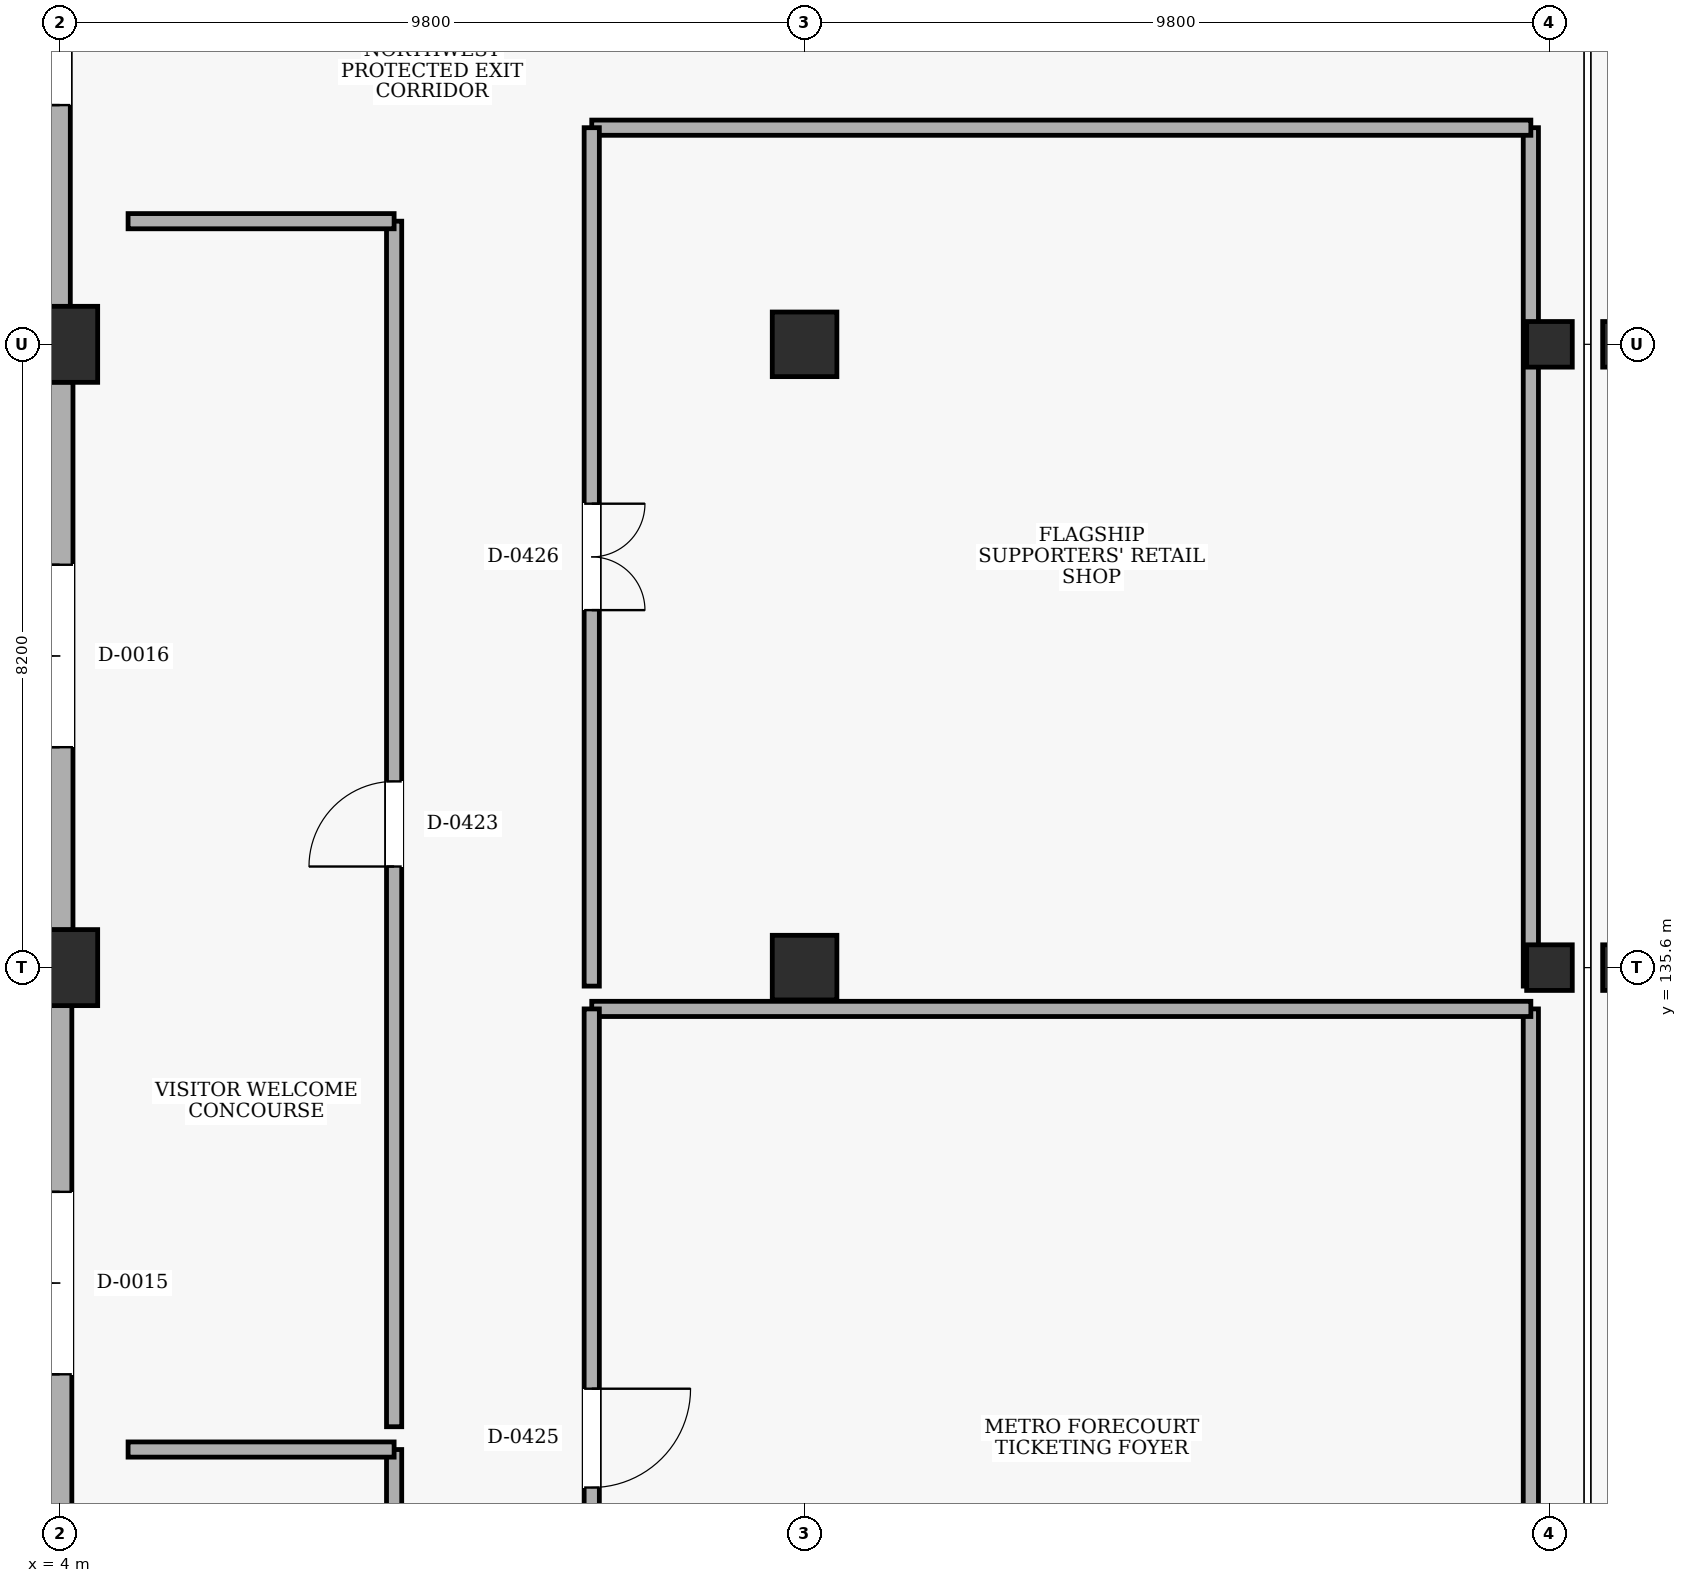
"""IFC4 building model, lengths in metres.
Left out: names, types, materials, properties, quantities, classifications, styles, units other than length and angle.
Written with IfcOpenShell. Run it as: python <this file> out.ifc"""

import sys

from ifc_helpers import new_model, si_unit, direction, frame, frame_2d, origin, origin_2d, place, context, subcontext, project, spatial, rectangle, extrude, element, fill, save


model = new_model("IFC4")
c1 = context("Model", 3, precision=1e-05, world=origin(), true_north=direction((0.0, 1.0)))
c2 = subcontext(c1, "Body", "Model", "MODEL_VIEW")
j1 = project(units=[si_unit("LENGTHUNIT", "METRE"), si_unit("PLANEANGLEUNIT", "RADIAN")], contexts=[c1])
p1 = place(None, origin())
s1 = spatial("IfcSite", under=j1, at=p1, CompositionType="ELEMENT")
p2 = place(p1, origin())
s2 = spatial("IfcBuilding", under=s1, at=p2, CompositionType="ELEMENT")
p3 = place(p2, origin())
s3 = spatial("IfcBuildingStorey", under=s2, at=p3, CompositionType="ELEMENT", Elevation=0.0)
for number, where, z_axis, x_axis in (
    (1, (4.0, 135.6, 0.0), (0.0, 0.0, 1.0), (1.0, 0.0, 0.0)),
    (2, (4.0, 143.8, 0.0), (0.0, 0.0, 1.0), (1.0, 0.0, 0.0)),
):
    element("IfcColumn", number, at=place(p3, frame(where, z_axis=z_axis, x_axis=x_axis)), inside=s3, PredefinedType="COLUMN", context=c2, shape_type="SweptSolid", body=[
        extrude(rectangle(XDim=1.0, YDim=1.0, at=origin_2d()), origin(), (0.0, 0.0, 1.0), 5.4),
    ])
for number, where, z_axis, x_axis in (
    (3, (13.8, 135.6, 0.0), (0.0, 0.0, 1.0), (1.0, 0.0, 0.0)),
    (4, (13.8, 143.8, 0.0), (0.0, 0.0, 1.0), (1.0, 0.0, 0.0)),
):
    element("IfcColumn", number, at=place(p3, frame(where, z_axis=z_axis, x_axis=x_axis)), inside=s3, PredefinedType="COLUMN", context=c2, shape_type="SweptSolid", body=[
        extrude(rectangle(XDim=0.85, YDim=0.85, at=origin_2d()), origin(), (0.0, 0.0, 1.0), 5.4),
    ])
for number, where, z_axis, x_axis in (
    (5, (23.6, 135.6, 0.0), (0.0, 0.0, 1.0), (1.0, 0.0, 0.0)),
    (6, (23.6, 143.8, 0.0), (0.0, 0.0, 1.0), (1.0, 0.0, 0.0)),
    (7, (24.6, 135.6, 0.0), (0.0, 0.0, 1.0), (1.0, 0.0, 0.0)),
    (8, (24.6, 143.8, 0.0), (0.0, 0.0, 1.0), (1.0, 0.0, 0.0)),
):
    element("IfcColumn", number, at=place(p3, frame(where, z_axis=z_axis, x_axis=x_axis)), inside=s3, PredefinedType="COLUMN", context=c2, shape_type="SweptSolid", body=[
        extrude(rectangle(XDim=0.6, YDim=0.6, at=origin_2d()), origin(), (0.0, 0.0, 1.0), 5.4),
    ])
p4 = place(p3, frame((4.0, 127.795, 0.0), z_axis=(0.0, 0.0, 1.0), x_axis=(0.0, 1.0, 0.0)))
e9 = element("IfcWall", 9, at=p4, inside=s3, PredefinedType="SOLIDWALL", context=c2, shape_type="SweptSolid", body=[
    extrude(rectangle(XDim=7.31, YDim=0.32, at=frame_2d((3.655, 0.0))), origin(), (0.0, 0.0, 1.0), 4.26),
])
p5 = place(p4, frame((2.455, 0.0, 0.0)))
e10 = element("IfcOpeningElement", 10, at=p5, cuts=e9, PredefinedType="OPENING", context=c2, shape_type="SweptSolid", body=[
    extrude(rectangle(XDim=2.4, YDim=2.2, at=frame_2d((1.2, 1.1))), frame((0.0, 0.17, 0.0), z_axis=(0.0, -1.0, 0.0), x_axis=(1.0, 0.0, 0.0)), (0.0, 0.0, 1.0), 0.34),
])
p6 = place(p3, frame((4.0, 136.095, 0.0), z_axis=(0.0, 0.0, 1.0), x_axis=(0.0, 1.0, 0.0)))
e11 = element("IfcWall", 11, at=p6, inside=s3, PredefinedType="SOLIDWALL", context=c2, shape_type="SweptSolid", body=[
    extrude(rectangle(XDim=7.21, YDim=0.35, at=frame_2d((3.605, 0.0))), origin(), (0.0, 0.0, 1.0), 4.26),
])
p7 = place(p6, frame((2.405, 0.0, 0.0)))
e12 = element("IfcOpeningElement", 12, at=p7, cuts=e11, PredefinedType="OPENING", context=c2, shape_type="SweptSolid", body=[
    extrude(rectangle(XDim=2.4, YDim=2.2, at=frame_2d((1.2, 1.1))), frame((0.0, 0.185, 0.0), z_axis=(0.0, -1.0, 0.0), x_axis=(1.0, 0.0, 0.0)), (0.0, 0.0, 1.0), 0.37),
])
p8 = place(p3, frame((4.0, 144.295, 0.0), z_axis=(0.0, 0.0, 1.0), x_axis=(0.0, 1.0, 0.0)))
e13 = element("IfcWall", 13, at=p8, inside=s3, PredefinedType="SOLIDWALL", context=c2, shape_type="SweptSolid", body=[
    extrude(rectangle(XDim=7.705, YDim=0.28, at=frame_2d((3.853, 0.0))), origin(), (0.0, 0.0, 1.0), 5.08),
])
p9 = place(p8, frame((2.653, 0.0, 0.0)))
e14 = element("IfcOpeningElement", 14, at=p9, cuts=e13, PredefinedType="OPENING", context=c2, shape_type="SweptSolid", body=[
    extrude(rectangle(XDim=2.4, YDim=2.2, at=frame_2d((1.2, 1.1))), frame((0.0, 0.15, 0.0), z_axis=(0.0, -1.0, 0.0), x_axis=(1.0, 0.0, 0.0)), (0.0, 0.0, 1.0), 0.3),
])
p10 = place(p3, frame((8.4, 112.17, 0.0), z_axis=(0.0, 0.0, 1.0), x_axis=(0.0, 1.0, 0.0)))
e15 = element("IfcWall", 15, at=p10, inside=s3, PredefinedType="PARTITIONING", context=c2, shape_type="SweptSolid", body=[
    extrude(rectangle(XDim=17.09, YDim=0.2, at=frame_2d((8.545, 0.0))), origin(), (0.0, 0.0, 1.0), 5.08),
])
p11 = place(p10, frame((8.02, 0.0, 0.0)))
e16 = element("IfcOpeningElement", 16, at=p11, cuts=e15, PredefinedType="OPENING", context=c2, shape_type="SweptSolid", body=[
    extrude(rectangle(XDim=1.05, YDim=2.15, at=frame_2d((0.525, 1.075))), frame((0.0, 0.11, 0.0), z_axis=(0.0, -1.0, 0.0), x_axis=(1.0, 0.0, 0.0)), (0.0, 0.0, 1.0), 0.22),
])
p12 = place(p3, frame((8.4, 129.26, 0.0), z_axis=(0.0, 0.0, 1.0), x_axis=(-1.0, 0.0, 0.0)))
e17 = element("IfcWall", 17, at=p12, inside=s3, PredefinedType="PARTITIONING", context=c2, shape_type="SweptSolid", body=[
    extrude(rectangle(XDim=3.5, YDim=0.2, at=frame_2d((1.75, 0.0))), origin(), (0.0, 0.0, 1.0), 5.08),
])
p13 = place(p3, frame((8.4, 129.56, 0.0), z_axis=(0.0, 0.0, 1.0), x_axis=(0.0, 1.0, 0.0)))
e18 = element("IfcWall", 18, at=p13, inside=s3, PredefinedType="PARTITIONING", context=c2, shape_type="SweptSolid", body=[
    extrude(rectangle(XDim=15.86, YDim=0.2, at=frame_2d((7.93, 0.0))), origin(), (0.0, 0.0, 1.0), 5.08),
])
p14 = place(p13, frame((7.37, 0.0, 0.0)))
e19 = element("IfcOpeningElement", 19, at=p14, cuts=e18, PredefinedType="OPENING", context=c2, shape_type="SweptSolid", body=[
    extrude(rectangle(XDim=1.12, YDim=2.15, at=frame_2d((0.56, 1.075))), frame((0.0, 0.11, 0.0), z_axis=(0.0, -1.0, 0.0), x_axis=(1.0, 0.0, 0.0)), (0.0, 0.0, 1.0), 0.22),
])
p15 = place(p3, frame((8.4, 145.42, 0.0), z_axis=(0.0, 0.0, 1.0), x_axis=(-1.0, 0.0, 0.0)))
e20 = element("IfcWall", 20, at=p15, inside=s3, PredefinedType="PARTITIONING", context=c2, shape_type="SweptSolid", body=[
    extrude(rectangle(XDim=3.5, YDim=0.2, at=frame_2d((1.75, 0.0))), origin(), (0.0, 0.0, 1.0), 5.08),
])
p16 = place(p3, frame((23.355, 123.763, 0.0), z_axis=(0.0, 0.0, 1.0), x_axis=(0.0, 1.0, 0.0)))
e21 = element("IfcWall", 21, at=p16, inside=s3, PredefinedType="PARTITIONING", context=c2, shape_type="SweptSolid", body=[
    extrude(rectangle(XDim=11.293, YDim=0.2, at=frame_2d((5.647, 0.0))), origin(), (0.0, 0.0, 1.0), 4.31),
])
p17 = place(p3, frame((23.355, 135.057, 0.0), z_axis=(0.0, 0.0, 1.0), x_axis=(-1.0, 0.0, 0.0)))
e22 = element("IfcWall", 22, at=p17, inside=s3, PredefinedType="PARTITIONING", context=c2, shape_type="SweptSolid", body=[
    extrude(rectangle(XDim=12.355, YDim=0.2, at=frame_2d((6.177, 0.0))), origin(), (0.0, 0.0, 1.0), 5.08),
])
p18 = place(p3, frame((11.0, 135.057, 0.0), z_axis=(0.0, 0.0, 1.0), x_axis=(0.0, -1.0, 0.0)))
e23 = element("IfcWall", 23, at=p18, inside=s3, PredefinedType="PARTITIONING", context=c2, shape_type="SweptSolid", body=[
    extrude(rectangle(XDim=11.293, YDim=0.2, at=frame_2d((5.647, 0.0))), origin(), (0.0, 0.0, 1.0), 5.08),
])
p19 = place(p18, frame((4.997, 0.0, 0.0)))
e24 = element("IfcOpeningElement", 24, at=p19, cuts=e23, PredefinedType="OPENING", context=c2, shape_type="SweptSolid", body=[
    extrude(rectangle(XDim=1.3, YDim=2.2, at=frame_2d((0.65, 1.1))), frame((0.0, 0.11, 0.0), z_axis=(0.0, -1.0, 0.0), x_axis=(1.0, 0.0, 0.0)), (0.0, 0.0, 1.0), 0.22),
])
p20 = place(p3, frame((23.355, 135.357, 0.0), z_axis=(0.0, 0.0, 1.0), x_axis=(0.0, 1.0, 0.0)))
e25 = element("IfcWall", 25, at=p20, inside=s3, PredefinedType="PARTITIONING", context=c2, shape_type="SweptSolid", body=[
    extrude(rectangle(XDim=11.293, YDim=0.2, at=frame_2d((5.646, 0.0))), origin(), (0.0, 0.0, 1.0), 4.31),
])
p21 = place(p3, frame((23.355, 146.65, 0.0), z_axis=(0.0, 0.0, 1.0), x_axis=(-1.0, 0.0, 0.0)))
e26 = element("IfcWall", 26, at=p21, inside=s3, PredefinedType="PARTITIONING", context=c2, shape_type="SweptSolid", body=[
    extrude(rectangle(XDim=12.355, YDim=0.2, at=frame_2d((6.177, 0.0))), origin(), (0.0, 0.0, 1.0), 5.08),
])
p22 = place(p3, frame((11.0, 146.65, 0.0), z_axis=(0.0, 0.0, 1.0), x_axis=(0.0, -1.0, 0.0)))
e27 = element("IfcWall", 27, at=p22, inside=s3, PredefinedType="PARTITIONING", context=c2, shape_type="SweptSolid", body=[
    extrude(rectangle(XDim=11.293, YDim=0.2, at=frame_2d((5.646, 0.0))), origin(), (0.0, 0.0, 1.0), 5.08),
])
p23 = place(p22, frame((4.947, 0.0, 0.0)))
e28 = element("IfcOpeningElement", 28, at=p23, cuts=e27, PredefinedType="OPENING", context=c2, shape_type="SweptSolid", body=[
    extrude(rectangle(XDim=1.4, YDim=2.2, at=frame_2d((0.7, 1.1))), frame((0.0, 0.11, 0.0), z_axis=(0.0, -1.0, 0.0), x_axis=(1.0, 0.0, 0.0)), (0.0, 0.0, 1.0), 0.22),
])
p24 = place(p5, origin())
e29 = element("IfcDoor", 29, at=p24, inside=s3, OperationType="DOUBLE_DOOR_SINGLE_SWING", PredefinedType="DOOR", context=c2, shape_type="SweptSolid", body=[
    extrude(rectangle(XDim=2.4, YDim=2.2, at=frame_2d((1.2, 1.1))), frame((0.0, 0.025, 0.0), z_axis=(0.0, -1.0, 0.0), x_axis=(1.0, 0.0, 0.0)), (0.0, 0.0, 1.0), 0.05),
])
fill(e10, e29)
p25 = place(p7, origin())
e30 = element("IfcDoor", 30, at=p25, inside=s3, OperationType="DOUBLE_DOOR_SINGLE_SWING", PredefinedType="DOOR", context=c2, shape_type="SweptSolid", body=[
    extrude(rectangle(XDim=2.4, YDim=2.2, at=frame_2d((1.2, 1.1))), frame((0.0, 0.025, 0.0), z_axis=(0.0, -1.0, 0.0), x_axis=(1.0, 0.0, 0.0)), (0.0, 0.0, 1.0), 0.05),
])
fill(e12, e30)
p26 = place(p9, origin())
e31 = element("IfcDoor", 31, at=p26, inside=s3, OperationType="DOUBLE_DOOR_SINGLE_SWING", PredefinedType="DOOR", context=c2, shape_type="SweptSolid", body=[
    extrude(rectangle(XDim=2.4, YDim=2.2, at=frame_2d((1.2, 1.1))), frame((0.0, 0.025, 0.0), z_axis=(0.0, -1.0, 0.0), x_axis=(1.0, 0.0, 0.0)), (0.0, 0.0, 1.0), 0.05),
])
fill(e14, e31)
p27 = place(p14, origin())
e32 = element("IfcDoor", 32, at=p27, inside=s3, OperationType="SINGLE_SWING_LEFT", PredefinedType="DOOR", context=c2, shape_type="SweptSolid", body=[
    extrude(rectangle(XDim=1.12, YDim=2.15, at=frame_2d((0.56, 1.075))), frame((0.0, 0.025, 0.0), z_axis=(0.0, -1.0, 0.0), x_axis=(1.0, 0.0, 0.0)), (0.0, 0.0, 1.0), 0.05),
])
fill(e19, e32)
p28 = place(p19, origin())
e33 = element("IfcDoor", 33, at=p28, inside=s3, OperationType="SINGLE_SWING_LEFT", PredefinedType="DOOR", context=c2, shape_type="SweptSolid", body=[
    extrude(rectangle(XDim=1.3, YDim=2.2, at=frame_2d((0.65, 1.1))), frame((0.0, 0.025, 0.0), z_axis=(0.0, -1.0, 0.0), x_axis=(1.0, 0.0, 0.0)), (0.0, 0.0, 1.0), 0.05),
])
fill(e24, e33)
p29 = place(p23, origin())
e34 = element("IfcDoor", 34, at=p29, inside=s3, OperationType="DOUBLE_DOOR_SINGLE_SWING", PredefinedType="DOOR", context=c2, shape_type="SweptSolid", body=[
    extrude(rectangle(XDim=1.4, YDim=2.2, at=frame_2d((0.7, 1.1))), frame((0.0, 0.025, 0.0), z_axis=(0.0, -1.0, 0.0), x_axis=(1.0, 0.0, 0.0)), (0.0, 0.0, 1.0), 0.05),
])
fill(e28, e34)
save(model, sys.argv[1])
